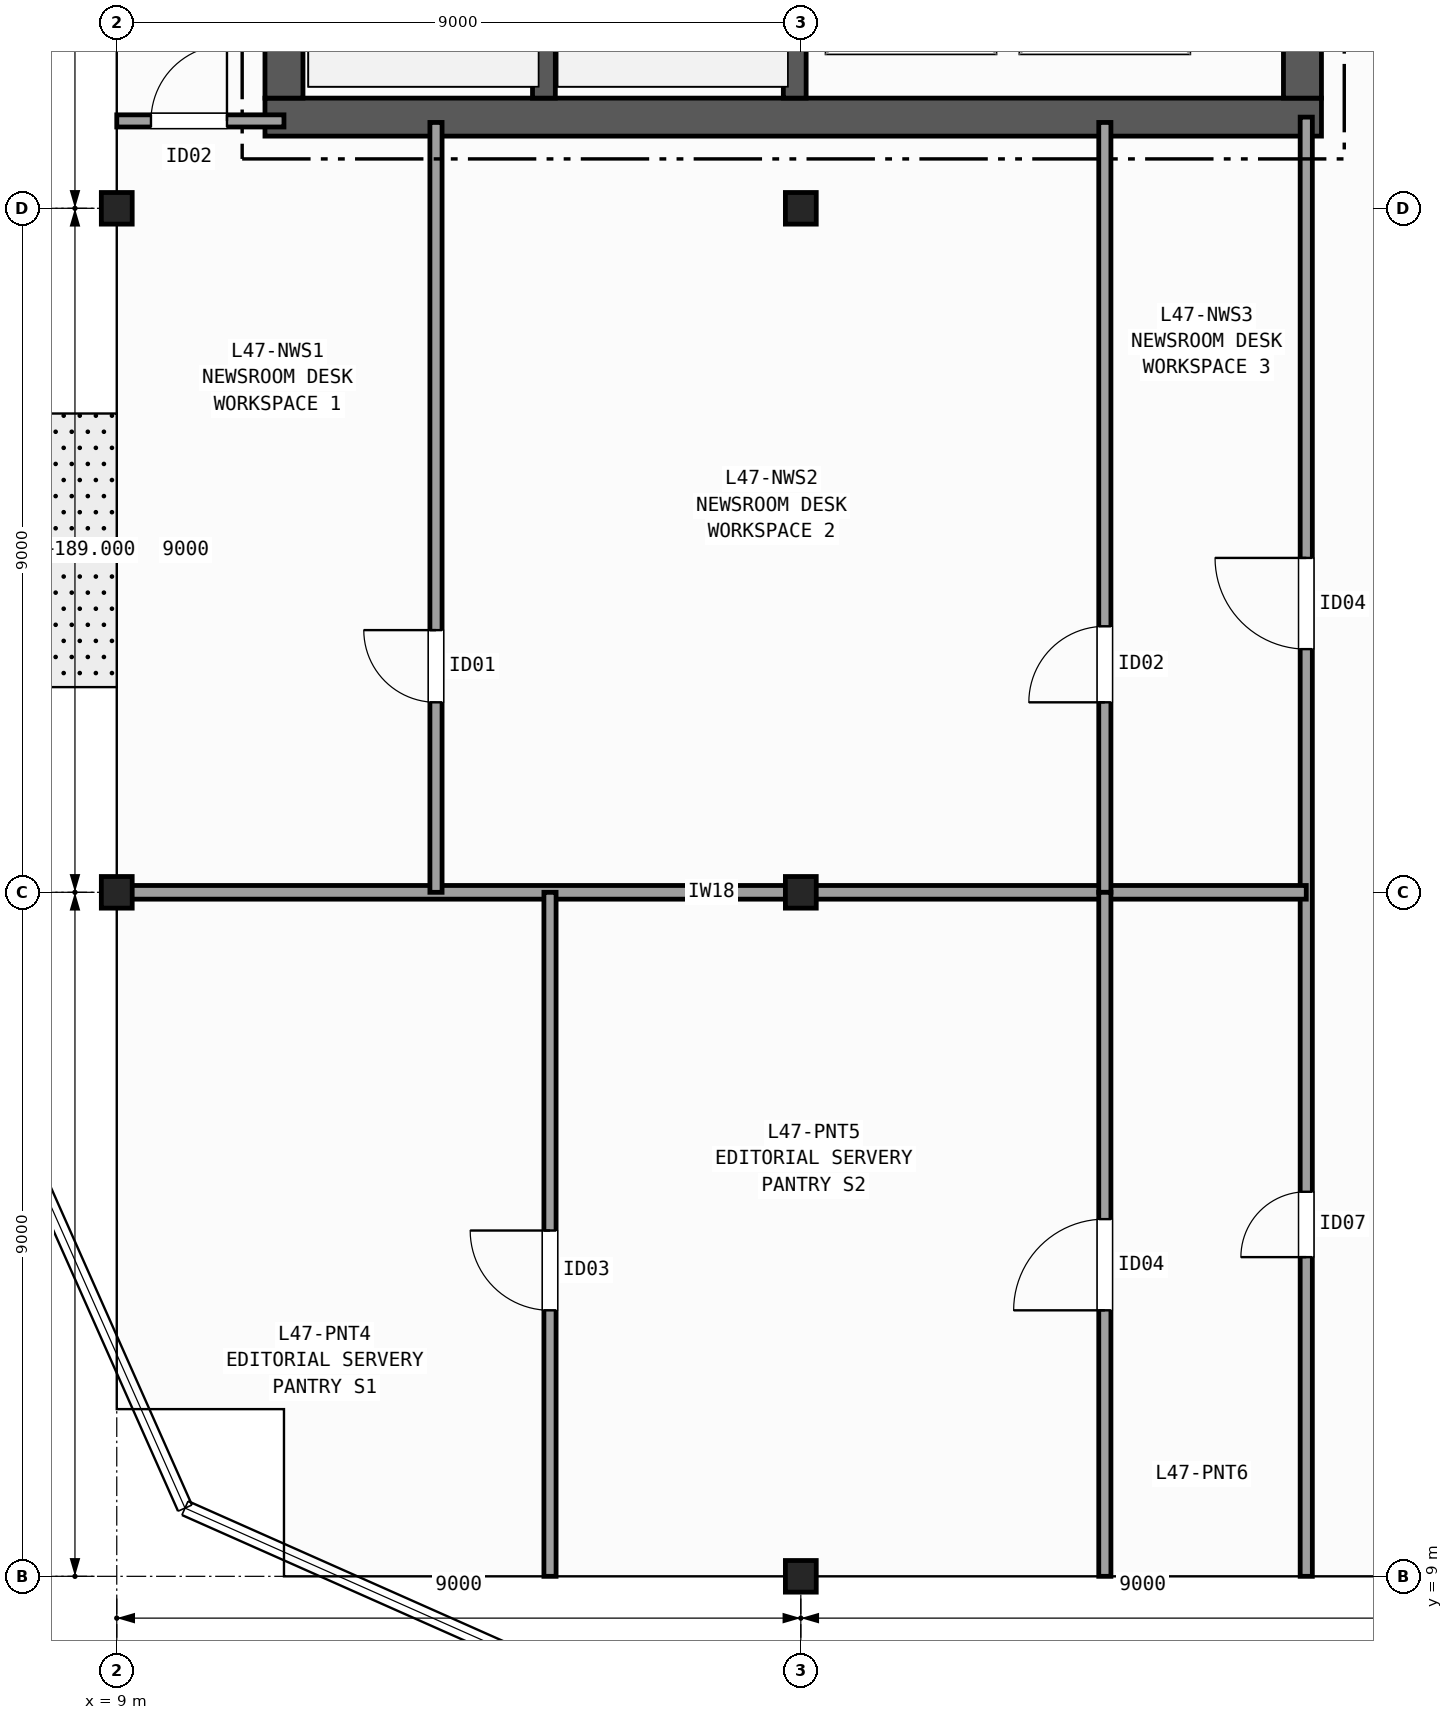
"""IFC4 building model, lengths in metres.
Left out: names, types, materials, properties, quantities, classifications, styles, units other than length and angle.
Written with IfcOpenShell. Run it as: python <this file> out.ifc"""

import sys

from ifc_helpers import new_model, si_unit, direction, frame, frame_2d, origin, origin_2d, place, context, subcontext, project, spatial, rectangle, i_section, extrude, element, fill, save


model = new_model("IFC4")
c1 = context("Model", 3, precision=1e-05, world=origin(), true_north=direction((0.0, 1.0)))
c2 = subcontext(c1, "Body", "Model", "MODEL_VIEW")
j1 = project(units=[si_unit("LENGTHUNIT", "METRE"), si_unit("PLANEANGLEUNIT", "RADIAN")], contexts=[c1])
p1 = place(None, origin())
s1 = spatial("IfcSite", under=j1, at=p1, CompositionType="ELEMENT")
p2 = place(p1, origin())
s2 = spatial("IfcBuilding", under=s1, at=p2, CompositionType="ELEMENT")
p3 = place(p2, frame((0.0, 0.0, 189.0)))
s3 = spatial("IfcBuildingStorey", under=s2, at=p3, CompositionType="ELEMENT", Elevation=189.0)
for number, where, z_axis, x_axis in (
    (1, (9.0, 18.0, 0.0), (0.0, 0.0, 1.0), (1.0, 0.0, 0.0)),
    (2, (9.0, 27.0, 0.0), (0.0, 0.0, 1.0), (1.0, 0.0, 0.0)),
    (3, (18.0, 9.0, 0.0), (0.0, 0.0, 1.0), (1.0, 0.0, 0.0)),
    (4, (18.0, 18.0, 0.0), (0.0, 0.0, 1.0), (1.0, 0.0, 0.0)),
    (5, (18.0, 27.0, 0.0), (0.0, 0.0, 1.0), (1.0, 0.0, 0.0)),
):
    element("IfcColumn", number, at=place(p3, frame(where, z_axis=z_axis, x_axis=x_axis)), inside=s3, PredefinedType="COLUMN", context=c2, shape_type="SweptSolid", body=[
        extrude(i_section(OverallWidth=0.406, OverallDepth=0.416, WebThickness=0.03, FlangeThickness=0.048, FilletRadius=0.015, at=origin_2d()), origin(), (0.0, 0.0, 1.0), 3.7),
    ])
p4 = place(p3, frame((10.95, 28.2, 0.0), z_axis=(0.0, 0.0, 1.0), x_axis=(1.0, 0.0, 0.0)))
e6 = element("IfcWall", 6, at=p4, inside=s3, PredefinedType="SHEAR", context=c2, shape_type="SweptSolid", body=[
    extrude(rectangle(XDim=13.9, YDim=0.5, at=frame_2d((6.95, 0.0))), origin(), (0.0, 0.0, 1.0), 3.42),
])
p5 = place(p3, frame((11.2, 42.15, 0.0), z_axis=(0.0, 0.0, 1.0), x_axis=(0.0, -1.0, 0.0)))
e7 = element("IfcWall", 7, at=p5, inside=s3, PredefinedType="SHEAR", context=c2, shape_type="SweptSolid", body=[
    extrude(rectangle(XDim=13.7, YDim=0.5, at=frame_2d((6.85, 0.0))), origin(), (0.0, 0.0, 1.0), 3.42),
])
p6 = place(p3, frame((24.6, 28.45, 0.0), z_axis=(0.0, 0.0, 1.0), x_axis=(0.0, 1.0, 0.0)))
e8 = element("IfcWall", 8, at=p6, inside=s3, PredefinedType="SHEAR", context=c2, shape_type="SweptSolid", body=[
    extrude(rectangle(XDim=13.7, YDim=0.5, at=frame_2d((6.85, 0.0))), origin(), (0.0, 0.0, 1.0), 3.42),
])
p7 = place(p6, frame((3.35, 0.0, 0.0)))
e9 = element("IfcOpeningElement", 9, at=p7, cuts=e8, PredefinedType="OPENING", context=c2, shape_type="SweptSolid", body=[
    extrude(rectangle(XDim=1.5, YDim=2.2, at=frame_2d((0.75, 1.1))), frame((0.0, 0.26, 0.0), z_axis=(0.0, -1.0, 0.0), x_axis=(1.0, 0.0, 0.0)), (0.0, 0.0, 1.0), 0.52),
])
p8 = place(p6, frame((9.95, 0.0, 0.0)))
e10 = element("IfcOpeningElement", 10, at=p8, cuts=e8, PredefinedType="OPENING", context=c2, shape_type="SweptSolid", body=[
    extrude(rectangle(XDim=0.9, YDim=2.1, at=frame_2d((0.45, 1.05))), frame((0.0, 0.26, 0.0), z_axis=(0.0, -1.0, 0.0), x_axis=(1.0, 0.0, 0.0)), (0.0, 0.0, 1.0), 0.52),
])
p9 = place(p6, frame((12.05, 0.0, 0.0)))
e11 = element("IfcOpeningElement", 11, at=p9, cuts=e8, PredefinedType="OPENING", context=c2, shape_type="SweptSolid", body=[
    extrude(rectangle(XDim=0.9, YDim=2.1, at=frame_2d((0.45, 1.05))), frame((0.0, 0.26, 0.0), z_axis=(0.0, -1.0, 0.0), x_axis=(1.0, 0.0, 0.0)), (0.0, 0.0, 1.0), 0.52),
])
p10 = place(p3, frame((14.62, 28.45, 0.0), z_axis=(0.0, 0.0, 1.0), x_axis=(0.0, 1.0, 0.0)))
e12 = element("IfcWall", 12, at=p10, inside=s3, PredefinedType="SHEAR", context=c2, shape_type="SweptSolid", body=[
    extrude(rectangle(XDim=9.0, YDim=0.3, at=frame_2d((4.5, 0.0))), origin(), (0.0, 0.0, 1.0), 3.42),
])
p11 = place(p3, frame((17.92, 42.15, 0.0), z_axis=(0.0, 0.0, 1.0), x_axis=(0.0, -1.0, 0.0)))
e13 = element("IfcWall", 13, at=p11, inside=s3, PredefinedType="SHEAR", context=c2, shape_type="SweptSolid", body=[
    extrude(rectangle(XDim=13.7, YDim=0.3, at=frame_2d((6.85, 0.0))), origin(), (0.0, 0.0, 1.0), 3.42),
])
p12 = place(p11, frame((1.975, 0.0, 0.0)))
e14 = element("IfcOpeningElement", 14, at=p12, cuts=e13, PredefinedType="OPENING", context=c2, shape_type="SweptSolid", body=[
    extrude(rectangle(XDim=1.15, YDim=2.15, at=frame_2d((0.575, 1.075))), frame((0.0, 0.16, 0.0), z_axis=(0.0, -1.0, 0.0), x_axis=(1.0, 0.0, 0.0)), (0.0, 0.0, 1.0), 0.32),
])
p13 = place(p3, frame((9.0, 28.15, 0.0), z_axis=(0.0, 0.0, 1.0), x_axis=(1.0, 0.0, 0.0)))
e15 = element("IfcWall", 15, at=p13, inside=s3, PredefinedType="PARTITIONING", context=c2, shape_type="SweptSolid", body=[
    extrude(rectangle(XDim=2.2, YDim=0.16, at=frame_2d((1.1, 0.0))), origin(), (0.0, 0.0, 1.0), 2.634),
])
p14 = place(p13, frame((0.45, 0.0, 0.0)))
e16 = element("IfcOpeningElement", 16, at=p14, cuts=e15, PredefinedType="OPENING", context=c2, shape_type="SweptSolid", body=[
    extrude(rectangle(XDim=1.0, YDim=2.1, at=frame_2d((0.5, 1.05))), frame((0.0, 0.09, 0.0), z_axis=(0.0, -1.0, 0.0), x_axis=(1.0, 0.0, 0.0)), (0.0, 0.0, 1.0), 0.18),
])
p15 = place(p3, frame((24.65, 9.0, 0.0), z_axis=(0.0, 0.0, 1.0), x_axis=(0.0, 1.0, 0.0)))
e17 = element("IfcWall", 17, at=p15, inside=s3, PredefinedType="PARTITIONING", context=c2, shape_type="SweptSolid", body=[
    extrude(rectangle(XDim=19.2, YDim=0.16, at=frame_2d((9.6, 0.0))), origin(), (0.0, 0.0, 1.0), 2.634),
])
p16 = place(p15, frame((12.2, 0.0, 0.0)))
e18 = element("IfcOpeningElement", 18, at=p16, cuts=e17, PredefinedType="OPENING", context=c2, shape_type="SweptSolid", body=[
    extrude(rectangle(XDim=1.2, YDim=2.15, at=frame_2d((0.6, 1.075))), frame((0.0, 0.09, 0.0), z_axis=(0.0, -1.0, 0.0), x_axis=(1.0, 0.0, 0.0)), (0.0, 0.0, 1.0), 0.18),
])
p17 = place(p15, frame((4.2, 0.0, 0.0)))
e19 = element("IfcOpeningElement", 19, at=p17, cuts=e17, PredefinedType="OPENING", context=c2, shape_type="SweptSolid", body=[
    extrude(rectangle(XDim=0.86, YDim=2.05, at=frame_2d((0.43, 1.025))), frame((0.0, 0.09, 0.0), z_axis=(0.0, -1.0, 0.0), x_axis=(1.0, 0.0, 0.0)), (0.0, 0.0, 1.0), 0.18),
])
p18 = place(p3, frame((9.0, 18.0, 0.0), z_axis=(0.0, 0.0, 1.0), x_axis=(1.0, 0.0, 0.0)))
e20 = element("IfcWall", 20, at=p18, inside=s3, PredefinedType="PARTITIONING", context=c2, shape_type="SweptSolid", body=[
    extrude(rectangle(XDim=15.65, YDim=0.18, at=frame_2d((7.825, 0.0))), origin(), (0.0, 0.0, 1.0), 2.634),
])
p19 = place(p3, frame((13.2, 18.0, 0.0), z_axis=(0.0, 0.0, 1.0), x_axis=(0.0, 1.0, 0.0)))
e21 = element("IfcWall", 21, at=p19, inside=s3, PredefinedType="PARTITIONING", context=c2, shape_type="SweptSolid", body=[
    extrude(rectangle(XDim=10.13, YDim=0.16, at=frame_2d((5.065, 0.0))), origin(), (0.0, 0.0, 1.0), 2.789),
])
p20 = place(p19, frame((2.5, 0.0, 0.0)))
e22 = element("IfcOpeningElement", 22, at=p20, cuts=e21, PredefinedType="OPENING", context=c2, shape_type="SweptSolid", body=[
    extrude(rectangle(XDim=0.95, YDim=2.1, at=frame_2d((0.475, 1.05))), frame((0.0, 0.09, 0.0), z_axis=(0.0, -1.0, 0.0), x_axis=(1.0, 0.0, 0.0)), (0.0, 0.0, 1.0), 0.18),
])
p21 = place(p3, frame((22.0, 18.0, 0.0), z_axis=(0.0, 0.0, 1.0), x_axis=(0.0, 1.0, 0.0)))
e23 = element("IfcWall", 23, at=p21, inside=s3, PredefinedType="PARTITIONING", context=c2, shape_type="SweptSolid", body=[
    extrude(rectangle(XDim=10.13, YDim=0.16, at=frame_2d((5.065, 0.0))), origin(), (0.0, 0.0, 1.0), 2.789),
])
p22 = place(p21, frame((2.5, 0.0, 0.0)))
e24 = element("IfcOpeningElement", 24, at=p22, cuts=e23, PredefinedType="OPENING", context=c2, shape_type="SweptSolid", body=[
    extrude(rectangle(XDim=1.0, YDim=2.1, at=frame_2d((0.5, 1.05))), frame((0.0, 0.09, 0.0), z_axis=(0.0, -1.0, 0.0), x_axis=(1.0, 0.0, 0.0)), (0.0, 0.0, 1.0), 0.18),
])
p23 = place(p3, frame((14.7, 9.0, 0.0), z_axis=(0.0, 0.0, 1.0), x_axis=(0.0, 1.0, 0.0)))
e25 = element("IfcWall", 25, at=p23, inside=s3, PredefinedType="PARTITIONING", context=c2, shape_type="SweptSolid", body=[
    extrude(rectangle(XDim=9.0, YDim=0.16, at=frame_2d((4.5, 0.0))), origin(), (0.0, 0.0, 1.0), 2.789),
])
p24 = place(p23, frame((3.5, 0.0, 0.0)))
e26 = element("IfcOpeningElement", 26, at=p24, cuts=e25, PredefinedType="OPENING", context=c2, shape_type="SweptSolid", body=[
    extrude(rectangle(XDim=1.05, YDim=2.15, at=frame_2d((0.525, 1.075))), frame((0.0, 0.09, 0.0), z_axis=(0.0, -1.0, 0.0), x_axis=(1.0, 0.0, 0.0)), (0.0, 0.0, 1.0), 0.18),
])
p25 = place(p3, frame((22.0, 9.0, 0.0), z_axis=(0.0, 0.0, 1.0), x_axis=(0.0, 1.0, 0.0)))
e27 = element("IfcWall", 27, at=p25, inside=s3, PredefinedType="PARTITIONING", context=c2, shape_type="SweptSolid", body=[
    extrude(rectangle(XDim=9.0, YDim=0.16, at=frame_2d((4.5, 0.0))), origin(), (0.0, 0.0, 1.0), 2.634),
])
p26 = place(p25, frame((3.5, 0.0, 0.0)))
e28 = element("IfcOpeningElement", 28, at=p26, cuts=e27, PredefinedType="OPENING", context=c2, shape_type="SweptSolid", body=[
    extrude(rectangle(XDim=1.2, YDim=2.15, at=frame_2d((0.6, 1.075))), frame((0.0, 0.09, 0.0), z_axis=(0.0, -1.0, 0.0), x_axis=(1.0, 0.0, 0.0)), (0.0, 0.0, 1.0), 0.18),
])
p27 = place(p14, origin())
e29 = element("IfcDoor", 29, at=p27, inside=s3, OperationType="SINGLE_SWING_RIGHT", PredefinedType="DOOR", context=c2, shape_type="SweptSolid", body=[
    extrude(rectangle(XDim=1.0, YDim=2.1, at=frame_2d((0.5, 1.05))), frame((0.0, 0.025, 0.0), z_axis=(0.0, -1.0, 0.0), x_axis=(1.0, 0.0, 0.0)), (0.0, 0.0, 1.0), 0.05),
])
fill(e16, e29)
p28 = place(p16, origin())
e30 = element("IfcDoor", 30, at=p28, inside=s3, OperationType="SINGLE_SWING_RIGHT", PredefinedType="DOOR", context=c2, shape_type="SweptSolid", body=[
    extrude(rectangle(XDim=1.2, YDim=2.15, at=frame_2d((0.6, 1.075))), frame((0.0, 0.025, 0.0), z_axis=(0.0, -1.0, 0.0), x_axis=(1.0, 0.0, 0.0)), (0.0, 0.0, 1.0), 0.05),
])
fill(e18, e30)
p29 = place(p17, origin())
e31 = element("IfcDoor", 31, at=p29, inside=s3, OperationType="SINGLE_SWING_LEFT", PredefinedType="DOOR", context=c2, shape_type="SweptSolid", body=[
    extrude(rectangle(XDim=0.86, YDim=2.05, at=frame_2d((0.43, 1.025))), frame((0.0, 0.025, 0.0), z_axis=(0.0, -1.0, 0.0), x_axis=(1.0, 0.0, 0.0)), (0.0, 0.0, 1.0), 0.05),
])
fill(e19, e31)
p30 = place(p20, origin())
e32 = element("IfcDoor", 32, at=p30, inside=s3, OperationType="SINGLE_SWING_RIGHT", PredefinedType="DOOR", context=c2, shape_type="SweptSolid", body=[
    extrude(rectangle(XDim=0.95, YDim=2.1, at=frame_2d((0.475, 1.05))), frame((0.0, 0.025, 0.0), z_axis=(0.0, -1.0, 0.0), x_axis=(1.0, 0.0, 0.0)), (0.0, 0.0, 1.0), 0.05),
])
fill(e22, e32)
p31 = place(p22, origin())
e33 = element("IfcDoor", 33, at=p31, inside=s3, OperationType="SINGLE_SWING_LEFT", PredefinedType="DOOR", context=c2, shape_type="SweptSolid", body=[
    extrude(rectangle(XDim=1.0, YDim=2.1, at=frame_2d((0.5, 1.05))), frame((0.0, 0.025, 0.0), z_axis=(0.0, -1.0, 0.0), x_axis=(1.0, 0.0, 0.0)), (0.0, 0.0, 1.0), 0.05),
])
fill(e24, e33)
p32 = place(p24, origin())
e34 = element("IfcDoor", 34, at=p32, inside=s3, OperationType="SINGLE_SWING_RIGHT", PredefinedType="DOOR", context=c2, shape_type="SweptSolid", body=[
    extrude(rectangle(XDim=1.05, YDim=2.15, at=frame_2d((0.525, 1.075))), frame((0.0, 0.025, 0.0), z_axis=(0.0, -1.0, 0.0), x_axis=(1.0, 0.0, 0.0)), (0.0, 0.0, 1.0), 0.05),
])
fill(e26, e34)
p33 = place(p26, origin())
e35 = element("IfcDoor", 35, at=p33, inside=s3, OperationType="SINGLE_SWING_LEFT", PredefinedType="DOOR", context=c2, shape_type="SweptSolid", body=[
    extrude(rectangle(XDim=1.2, YDim=2.15, at=frame_2d((0.6, 1.075))), frame((0.0, 0.025, 0.0), z_axis=(0.0, -1.0, 0.0), x_axis=(1.0, 0.0, 0.0)), (0.0, 0.0, 1.0), 0.05),
])
fill(e28, e35)
save(model, sys.argv[1])
